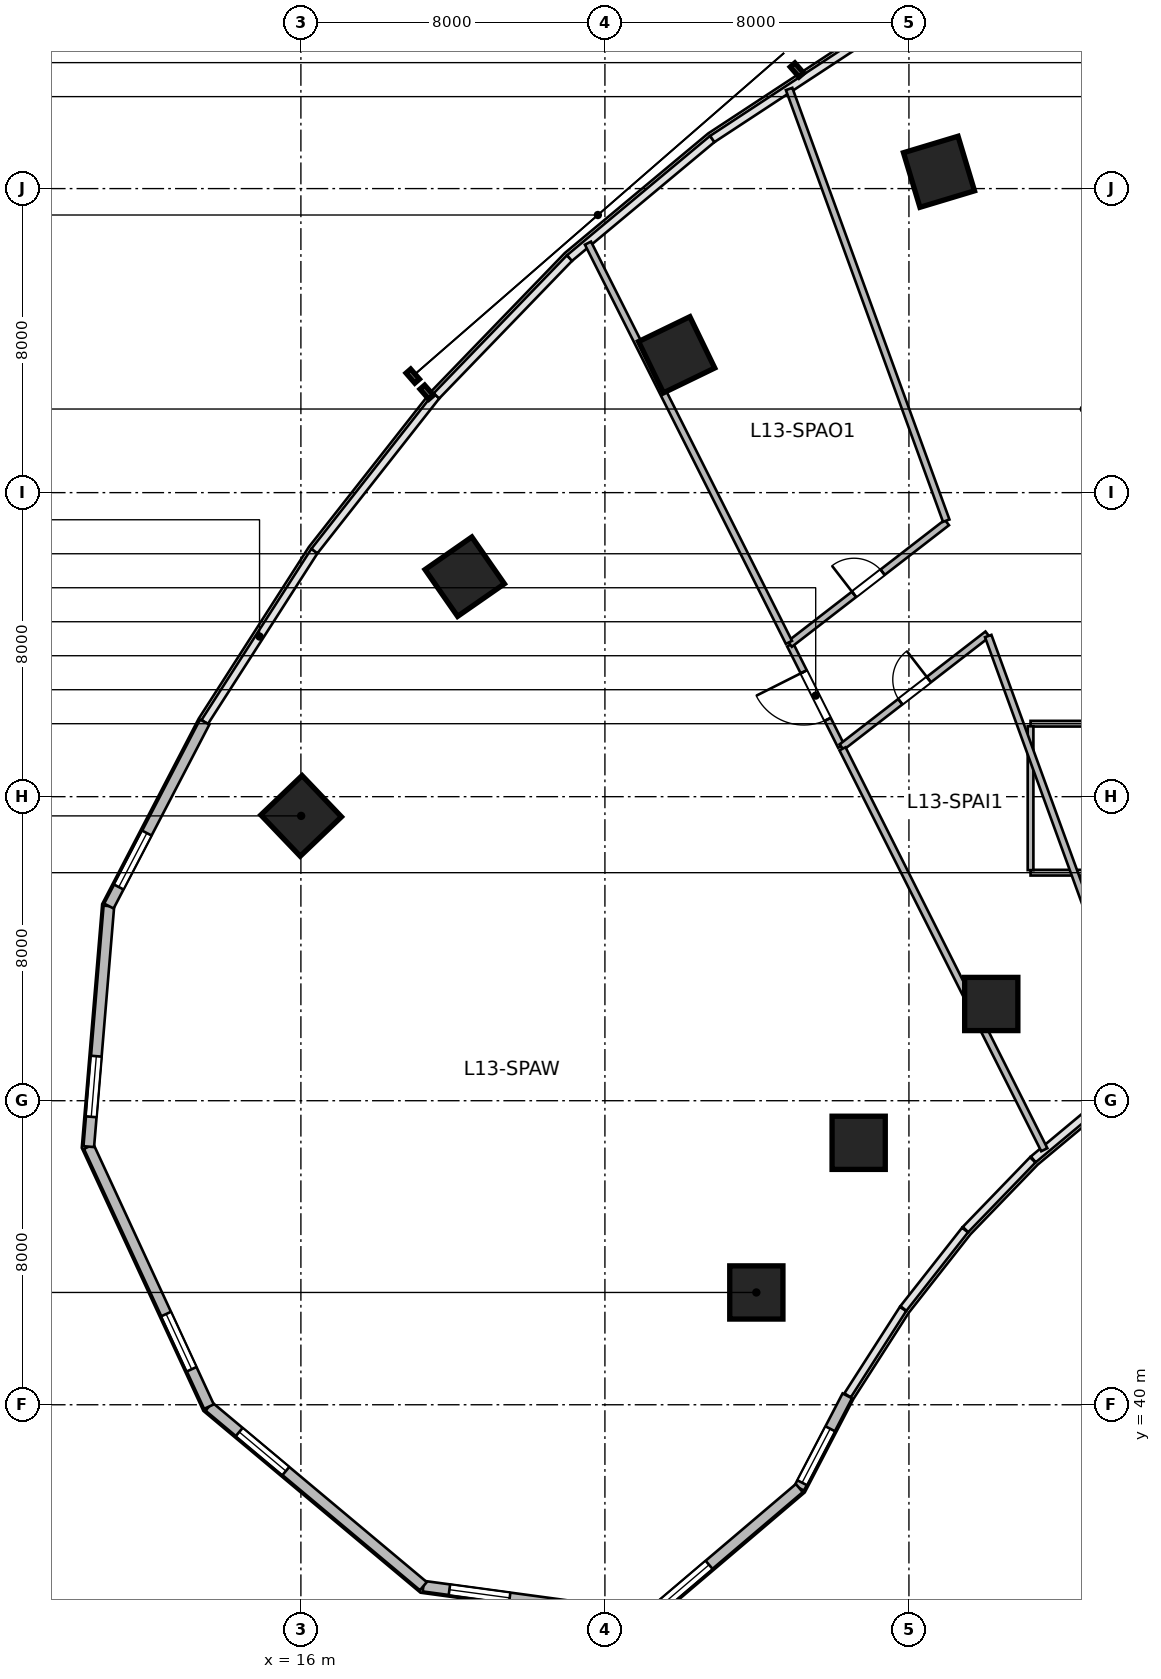
"""IFC4 building model, lengths in metres.
Left out: names, types, materials, properties, quantities, classifications, styles, units other than length and angle.
Written with IfcOpenShell. Run it as: python <this file> out.ifc"""

import sys

from ifc_helpers import new_model, si_unit, direction, frame, frame_2d, origin, origin_2d, place, context, subcontext, project, spatial, rectangle, circle, extrude, source, transform, mapped, element, fill, save


model = new_model("IFC4")
c1 = context("Model", 3, precision=1e-05, world=origin(), true_north=direction((0.0, 1.0)))
c2 = subcontext(c1, "Body", "Model", "MODEL_VIEW")
j1 = project(units=[si_unit("LENGTHUNIT", "METRE"), si_unit("PLANEANGLEUNIT", "RADIAN")], contexts=[c1])
p1 = place(None, origin())
s1 = spatial("IfcSite", under=j1, at=p1, CompositionType="ELEMENT")
p2 = place(p1, origin())
s2 = spatial("IfcBuilding", under=s1, at=p2, CompositionType="ELEMENT")
p3 = place(p2, frame((0.0, 0.0, 60.6)))
s3 = spatial("IfcBuildingStorey", under=s2, at=p3, CompositionType="ELEMENT", Elevation=60.6)
m1 = source(origin(), c2, "Body", "SweptSolid", [
    extrude(circle(Radius=0.7, at=origin_2d()), origin(), (0.0, 0.0, 1.0), 3.6),
])
p4 = place(p3, frame((27.985, 42.955, 0.0), z_axis=(0.0, 0.0, 1.0), x_axis=(-0.690756218984, 0.723087716626, 0.0)))
e1 = element("IfcColumn", 1, at=p4, inside=s3, PredefinedType="COLUMN", context=c2, shape_type="MappedRepresentation", body=[
    mapped(m1, transform((0.0, 0.0, 0.0), scale=1.0)),
])
m2 = source(origin(), c2, "Body", "SweptSolid", [
    extrude(rectangle(XDim=1.5, YDim=1.5, at=origin_2d()), origin(), (0.0, 0.0, 1.0), 3.6),
])
p5 = place(p3, frame((16.007, 55.494, 0.0), z_axis=(0.0, 0.0, 1.0), x_axis=(-0.690756218984, 0.723087716626, 0.0)))
e2 = element("IfcColumn", 2, at=p5, inside=s3, PredefinedType="COLUMN", context=c2, shape_type="MappedRepresentation", body=[
    mapped(m2, transform((0.0, 0.0, 0.0), scale=1.0)),
])
p6 = place(p3, frame((30.677, 46.892, 0.0), z_axis=(0.0, 0.0, 1.0), x_axis=(-0.571143442153, 0.820850271661, 0.0)))
e3 = element("IfcColumn", 3, at=p6, inside=s3, PredefinedType="COLUMN", context=c2, shape_type="MappedRepresentation", body=[
    mapped(m1, transform((0.0, 0.0, 0.0), scale=1.0)),
])
p7 = place(p3, frame((20.311, 61.789, 0.0), z_axis=(0.0, 0.0, 1.0), x_axis=(-0.571143442153, 0.820850271661, 0.0)))
e4 = element("IfcColumn", 4, at=p7, inside=s3, PredefinedType="COLUMN", context=c2, shape_type="MappedRepresentation", body=[
    mapped(m2, transform((0.0, 0.0, 0.0), scale=1.0)),
])
p8 = place(p3, frame((34.166, 50.545, 0.0), z_axis=(0.0, 0.0, 1.0), x_axis=(-0.436173672171, 0.899862504889, 0.0)))
e5 = element("IfcColumn", 5, at=p8, inside=s3, PredefinedType="COLUMN", context=c2, shape_type="MappedRepresentation", body=[
    mapped(m1, transform((0.0, 0.0, 0.0), scale=1.0)),
])
for number, where, z_axis, x_axis in (
    (6, (25.888, 67.627, 0.0), (0.0, 0.0, 1.0), (-0.436, 0.9, 0.0)),
    (7, (32.791, 72.442, 0.0), (0.0, 0.0, 1.0), (-0.289, 0.957, 0.0)),
):
    element("IfcColumn", number, at=place(p3, frame(where, z_axis=z_axis, x_axis=x_axis)), inside=s3, PredefinedType="COLUMN", context=c2, shape_type="MappedRepresentation", body=[
        mapped(m2, transform((0.0, 0.0, 0.0), scale=1.0)),
    ])
m3 = source(origin(), c2, "Body", "SweptSolid", [
    extrude(rectangle(XDim=2.735, YDim=0.28, at=frame_2d((1.368, 0.0))), origin(), (0.0, 0.0, 1.0), 3.36),
])
p9 = place(p3, frame((30.378, 40.234, 0.0), z_axis=(0.0, 0.0, 1.0), x_axis=(-0.46179107292, -0.886988728774, 0.0)))
e8 = element("IfcWall", 8, at=p9, inside=s3, PredefinedType="SOLIDWALL", context=c2, shape_type="MappedRepresentation", body=[
    mapped(m3, transform((0.0, 0.0, 0.0), scale=1.0)),
])
p10 = place(p9, frame((0.976, 0.0, 0.95)))
e9 = element("IfcOpeningElement", 9, at=p10, cuts=e8, PredefinedType="OPENING", context=c2, shape_type="SweptSolid", body=[
    extrude(rectangle(XDim=1.6, YDim=1.9, at=frame_2d((0.8, 0.95))), frame((0.0, 0.15, 0.0), z_axis=(0.0, -1.0, 0.0), x_axis=(1.0, 0.0, 0.0)), (0.0, 0.0, 1.0), 0.3),
])
m4 = source(origin(), c2, "Body", "SweptSolid", [
    extrude(rectangle(XDim=5.222, YDim=0.28, at=frame_2d((2.611, 0.0))), origin(), (0.0, 0.0, 1.0), 3.36),
])
p11 = place(p3, frame((29.115, 37.807, 0.0), z_axis=(0.0, 0.0, 1.0), x_axis=(-0.761900099546, -0.647694556339, 0.0)))
e10 = element("IfcWall", 10, at=p11, inside=s3, PredefinedType="SOLIDWALL", context=c2, shape_type="MappedRepresentation", body=[
    mapped(m4, transform((0.0, 0.0, 0.0), scale=1.0)),
])
p12 = place(p11, frame((3.117, 0.0, 0.95)))
e11 = element("IfcOpeningElement", 11, at=p12, cuts=e10, PredefinedType="OPENING", context=c2, shape_type="SweptSolid", body=[
    extrude(rectangle(XDim=1.6, YDim=1.9, at=frame_2d((0.8, 0.95))), frame((0.0, 0.15, 0.0), z_axis=(0.0, -1.0, 0.0), x_axis=(1.0, 0.0, 0.0)), (0.0, 0.0, 1.0), 0.3),
])
m5 = source(origin(), c2, "Body", "SweptSolid", [
    extrude(rectangle(XDim=5.967, YDim=0.28, at=frame_2d((2.984, 0.0))), origin(), (0.0, 0.0, 1.0), 3.36),
])
p13 = place(p3, frame((25.136, 34.425, 0.0), z_axis=(0.0, 0.0, 1.0), x_axis=(-0.990927009341, 0.134401124099, 0.0)))
e12 = element("IfcWall", 12, at=p13, inside=s3, PredefinedType="SOLIDWALL", context=c2, shape_type="MappedRepresentation", body=[
    mapped(m5, transform((0.0, 0.0, 0.0), scale=1.0)),
])
p14 = place(p13, frame((3.676, 0.0, 0.95)))
e13 = element("IfcOpeningElement", 13, at=p14, cuts=e12, PredefinedType="OPENING", context=c2, shape_type="SweptSolid", body=[
    extrude(rectangle(XDim=1.6, YDim=1.9, at=frame_2d((0.8, 0.95))), frame((0.0, 0.15, 0.0), z_axis=(0.0, -1.0, 0.0), x_axis=(1.0, 0.0, 0.0)), (0.0, 0.0, 1.0), 0.3),
])
m6 = source(origin(), c2, "Body", "SweptSolid", [
    extrude(rectangle(XDim=7.359, YDim=0.28, at=frame_2d((3.679, 0.0))), origin(), (0.0, 0.0, 1.0), 3.36),
])
p15 = place(p3, frame((19.223, 35.227, 0.0), z_axis=(0.0, 0.0, 1.0), x_axis=(-0.766737165543, 0.641961150675, 0.0)))
e14 = element("IfcWall", 14, at=p15, inside=s3, PredefinedType="SOLIDWALL", context=c2, shape_type="MappedRepresentation", body=[
    mapped(m6, transform((0.0, 0.0, 0.0), scale=1.0)),
])
p16 = place(p15, frame((4.719, 0.0, 0.95)))
e15 = element("IfcOpeningElement", 15, at=p16, cuts=e14, PredefinedType="OPENING", context=c2, shape_type="SweptSolid", body=[
    extrude(rectangle(XDim=1.6, YDim=1.9, at=frame_2d((0.8, 0.95))), frame((0.0, 0.15, 0.0), z_axis=(0.0, -1.0, 0.0), x_axis=(1.0, 0.0, 0.0)), (0.0, 0.0, 1.0), 0.3),
])
m7 = source(origin(), c2, "Body", "SweptSolid", [
    extrude(rectangle(XDim=7.536, YDim=0.28, at=frame_2d((3.768, 0.0))), origin(), (0.0, 0.0, 1.0), 3.36),
])
p17 = place(p3, frame((13.58, 39.951, 0.0), z_axis=(0.0, 0.0, 1.0), x_axis=(-0.41964973873, 0.907686122393, 0.0)))
e16 = element("IfcWall", 16, at=p17, inside=s3, PredefinedType="SOLIDWALL", context=c2, shape_type="MappedRepresentation", body=[
    mapped(m7, transform((0.0, 0.0, 0.0), scale=1.0)),
])
p18 = place(p17, frame((1.084, 0.0, 0.95)))
e17 = element("IfcOpeningElement", 17, at=p18, cuts=e16, PredefinedType="OPENING", context=c2, shape_type="SweptSolid", body=[
    extrude(rectangle(XDim=1.6, YDim=1.9, at=frame_2d((0.8, 0.95))), frame((0.0, 0.15, 0.0), z_axis=(0.0, -1.0, 0.0), x_axis=(1.0, 0.0, 0.0)), (0.0, 0.0, 1.0), 0.3),
])
m8 = source(origin(), c2, "Body", "SweptSolid", [
    extrude(rectangle(XDim=6.353, YDim=0.28, at=frame_2d((3.176, 0.0))), origin(), (0.0, 0.0, 1.0), 3.36),
])
p19 = place(p3, frame((10.418, 46.792, 0.0), z_axis=(0.0, 0.0, 1.0), x_axis=(0.083319001377, 0.996522926986, 0.0)))
e18 = element("IfcWall", 18, at=p19, inside=s3, PredefinedType="SOLIDWALL", context=c2, shape_type="MappedRepresentation", body=[
    mapped(m8, transform((0.0, 0.0, 0.0), scale=1.0)),
])
p20 = place(p19, frame((0.788, 0.0, 0.95)))
e19 = element("IfcOpeningElement", 19, at=p20, cuts=e18, PredefinedType="OPENING", context=c2, shape_type="SweptSolid", body=[
    extrude(rectangle(XDim=1.6, YDim=1.9, at=frame_2d((0.8, 0.95))), frame((0.0, 0.15, 0.0), z_axis=(0.0, -1.0, 0.0), x_axis=(1.0, 0.0, 0.0)), (0.0, 0.0, 1.0), 0.3),
])
m9 = source(origin(), c2, "Body", "SweptSolid", [
    extrude(rectangle(XDim=5.459, YDim=0.28, at=frame_2d((2.73, 0.0))), origin(), (0.0, 0.0, 1.0), 3.36),
])
p21 = place(p3, frame((10.947, 53.122, 0.0), z_axis=(0.0, 0.0, 1.0), x_axis=(0.461768054321, 0.887000712518, 0.0)))
e20 = element("IfcWall", 20, at=p21, inside=s3, PredefinedType="SOLIDWALL", context=c2, shape_type="MappedRepresentation", body=[
    mapped(m9, transform((0.0, 0.0, 0.0), scale=1.0)),
])
p22 = place(p21, frame((0.565, 0.0, 0.95)))
e21 = element("IfcOpeningElement", 21, at=p22, cuts=e20, PredefinedType="OPENING", context=c2, shape_type="SweptSolid", body=[
    extrude(rectangle(XDim=1.6, YDim=1.9, at=frame_2d((0.8, 0.95))), frame((0.0, 0.15, 0.0), z_axis=(0.0, -1.0, 0.0), x_axis=(1.0, 0.0, 0.0)), (0.0, 0.0, 1.0), 0.3),
])
m10 = source(origin(), c2, "Body", "SweptSolid", [
    extrude(rectangle(XDim=6.6, YDim=0.15, at=frame_2d((3.3, 0.0))), origin(), (0.0, 0.0, 1.0), 2.803),
])
p23 = place(p3, frame((35.2, 54.0, 0.0), z_axis=(0.0, 0.0, 1.0), x_axis=(1.0, 0.0, 0.0)))
e22 = element("IfcWall", 22, at=p23, inside=s3, PredefinedType="PARTITIONING", context=c2, shape_type="MappedRepresentation", body=[
    mapped(m10, transform((0.0, 0.0, 0.0), scale=1.0)),
])
m11 = source(origin(), c2, "Body", "SweptSolid", [
    extrude(rectangle(XDim=6.6, YDim=0.15, at=frame_2d((3.3, 0.0))), origin(), (0.0, 0.0, 1.0), 3.36),
])
p24 = place(p3, frame((35.2, 57.92, 0.0), z_axis=(0.0, 0.0, 1.0), x_axis=(1.0, 0.0, 0.0)))
e23 = element("IfcWall", 23, at=p24, inside=s3, PredefinedType="PARTITIONING", context=c2, shape_type="MappedRepresentation", body=[
    mapped(m11, transform((0.0, 0.0, 0.0), scale=1.0)),
])
p25 = place(p24, frame((2.85, 0.0, 0.0)))
e24 = element("IfcOpeningElement", 24, at=p25, cuts=e23, PredefinedType="OPENING", context=c2, shape_type="SweptSolid", body=[
    extrude(rectangle(XDim=0.9, YDim=2.1, at=frame_2d((0.45, 1.05))), frame((0.0, 0.085, 0.0), z_axis=(0.0, -1.0, 0.0), x_axis=(1.0, 0.0, 0.0)), (0.0, 0.0, 1.0), 0.17),
])
m12 = source(origin(), c2, "Body", "SweptSolid", [
    extrude(rectangle(XDim=3.785, YDim=0.15, at=frame_2d((1.893, 0.0))), origin(), (0.0, 0.0, 1.0), 3.36),
])
p26 = place(p3, frame((35.2, 54.067, 0.0), z_axis=(0.0, 0.0, 1.0), x_axis=(0.0, 1.0, 0.0)))
e25 = element("IfcWall", 25, at=p26, inside=s3, PredefinedType="PARTITIONING", context=c2, shape_type="MappedRepresentation", body=[
    mapped(m12, transform((0.0, 0.0, 0.0), scale=1.0)),
])
m13 = source(origin(), c2, "Body", "SweptSolid", [
    extrude(rectangle(XDim=2.985, YDim=0.18, at=frame_2d((1.493, 0.0))), origin(), (0.0, 0.0, 1.0), 3.36),
])
p27 = place(p3, frame((30.218, 57.327, 0.0), z_axis=(0.0, 0.0, 1.0), x_axis=(-0.449665526069, 0.893197018952, 0.0)))
e26 = element("IfcWall", 26, at=p27, inside=s3, PredefinedType="PLUMBINGWALL", context=c2, shape_type="MappedRepresentation", body=[
    mapped(m13, transform((0.0, 0.0, 0.0), scale=1.0)),
])
p28 = place(p27, frame((0.792, 0.0, 0.0)))
e27 = element("IfcOpeningElement", 27, at=p28, cuts=e26, PredefinedType="OPENING", context=c2, shape_type="SweptSolid", body=[
    extrude(rectangle(XDim=1.4, YDim=2.15, at=frame_2d((0.7, 1.075))), frame((0.0, 0.1, 0.0), z_axis=(0.0, -1.0, 0.0), x_axis=(1.0, 0.0, 0.0)), (0.0, 0.0, 1.0), 0.2),
])
m14 = source(origin(), c2, "Body", "SweptSolid", [
    extrude(rectangle(XDim=5.227, YDim=0.18, at=frame_2d((2.614, 0.0))), origin(), (0.0, 0.0, 1.0), 3.36),
])
p29 = place(p3, frame((28.865, 60.015, 0.0), z_axis=(0.0, 0.0, 1.0), x_axis=(0.790908912792, 0.61193389485, 0.0)))
e28 = element("IfcWall", 28, at=p29, inside=s3, PredefinedType="PLUMBINGWALL", context=c2, shape_type="MappedRepresentation", body=[
    mapped(m14, transform((0.0, 0.0, 0.0), scale=1.0)),
])
p30 = place(p29, frame((2.139, 0.0, 0.0)))
e29 = element("IfcOpeningElement", 29, at=p30, cuts=e28, PredefinedType="OPENING", context=c2, shape_type="SweptSolid", body=[
    extrude(rectangle(XDim=0.95, YDim=2.1, at=frame_2d((0.475, 1.05))), frame((0.0, 0.1, 0.0), z_axis=(0.0, -1.0, 0.0), x_axis=(1.0, 0.0, 0.0)), (0.0, 0.0, 1.0), 0.2),
])
m15 = source(origin(), c2, "Body", "SweptSolid", [
    extrude(rectangle(XDim=11.761, YDim=0.18, at=frame_2d((5.88, 0.0))), origin(), (0.0, 0.0, 1.0), 3.36),
])
p31 = place(p3, frame((28.842, 60.06, 0.0), z_axis=(0.0, 0.0, 1.0), x_axis=(-0.449611686329, 0.893224121661, 0.0)))
e30 = element("IfcWall", 30, at=p31, inside=s3, PredefinedType="PLUMBINGWALL", context=c2, shape_type="MappedRepresentation", body=[
    mapped(m15, transform((0.0, 0.0, 0.0), scale=1.0)),
])
m16 = source(origin(), c2, "Body", "SweptSolid", [
    extrude(rectangle(XDim=12.088, YDim=0.18, at=frame_2d((6.044, 0.0))), origin(), (0.0, 0.0, 1.0), 3.36),
])
p32 = place(p3, frame((32.981, 63.262, 0.0), z_axis=(0.0, 0.0, 1.0), x_axis=(-0.34203007529, 0.939689005787, 0.0)))
e31 = element("IfcWall", 31, at=p32, inside=s3, PredefinedType="PLUMBINGWALL", context=c2, shape_type="MappedRepresentation", body=[
    mapped(m16, transform((0.0, 0.0, 0.0), scale=1.0)),
])
m17 = source(origin(), c2, "Body", "SweptSolid", [
    extrude(rectangle(XDim=4.855, YDim=0.18, at=frame_2d((2.427, 0.0))), origin(), (0.0, 0.0, 1.0), 3.36),
])
p33 = place(p3, frame((30.229, 57.305, 0.0), z_axis=(0.0, 0.0, 1.0), x_axis=(0.790930965655, 0.611905391028, 0.0)))
e32 = element("IfcWall", 32, at=p33, inside=s3, PredefinedType="PLUMBINGWALL", context=c2, shape_type="MappedRepresentation", body=[
    mapped(m17, transform((0.0, 0.0, 0.0), scale=1.0)),
])
p34 = place(p33, frame((1.952, 0.0, 0.0)))
e33 = element("IfcOpeningElement", 33, at=p34, cuts=e32, PredefinedType="OPENING", context=c2, shape_type="SweptSolid", body=[
    extrude(rectangle(XDim=0.95, YDim=2.1, at=frame_2d((0.475, 1.05))), frame((0.0, 0.1, 0.0), z_axis=(0.0, -1.0, 0.0), x_axis=(1.0, 0.0, 0.0)), (0.0, 0.0, 1.0), 0.2),
])
m18 = source(origin(), c2, "Body", "SweptSolid", [
    extrude(rectangle(XDim=11.811, YDim=0.18, at=frame_2d((5.906, 0.0))), origin(), (0.0, 0.0, 1.0), 3.36),
])
p35 = place(p3, frame((35.562, 46.71, 0.0), z_axis=(0.0, 0.0, 1.0), x_axis=(-0.449626289102, 0.893216771086, 0.0)))
e34 = element("IfcWall", 34, at=p35, inside=s3, PredefinedType="PLUMBINGWALL", context=c2, shape_type="MappedRepresentation", body=[
    mapped(m18, transform((0.0, 0.0, 0.0), scale=1.0)),
])
m19 = source(origin(), c2, "Body", "SweptSolid", [
    extrude(rectangle(XDim=12.196, YDim=0.18, at=frame_2d((6.098, 0.0))), origin(), (0.0, 0.0, 1.0), 3.36),
])
p36 = place(p3, frame((38.258, 48.766, 0.0), z_axis=(0.0, 0.0, 1.0), x_axis=(-0.342022711534, 0.939691686031, 0.0)))
e35 = element("IfcWall", 35, at=p36, inside=s3, PredefinedType="PLUMBINGWALL", context=c2, shape_type="MappedRepresentation", body=[
    mapped(m19, transform((0.0, 0.0, 0.0), scale=1.0)),
])
m20 = source(origin(), c2, "Body", "SweptSolid", [
    extrude(rectangle(XDim=1.6, YDim=1.9, at=frame_2d((0.8, 0.95))), frame((0.0, 0.03, 0.0), z_axis=(0.0, -1.0, 0.0), x_axis=(1.0, 0.0, 0.0)), (0.0, 0.0, 1.0), 0.06),
])
p37 = place(p10, origin())
e36 = element("IfcWindow", 36, at=p37, inside=s3, PartitioningType="SINGLE_PANEL", PredefinedType="WINDOW", context=c2, shape_type="MappedRepresentation", body=[
    mapped(m20, transform((0.0, 0.0, 0.0), scale=1.0)),
])
fill(e9, e36)
p38 = place(p12, origin())
e37 = element("IfcWindow", 37, at=p38, inside=s3, PartitioningType="SINGLE_PANEL", PredefinedType="WINDOW", context=c2, shape_type="MappedRepresentation", body=[
    mapped(m20, transform((0.0, 0.0, 0.0), scale=1.0)),
])
fill(e11, e37)
p39 = place(p14, origin())
e38 = element("IfcWindow", 38, at=p39, inside=s3, PartitioningType="SINGLE_PANEL", PredefinedType="WINDOW", context=c2, shape_type="MappedRepresentation", body=[
    mapped(m20, transform((0.0, 0.0, 0.0), scale=1.0)),
])
fill(e13, e38)
p40 = place(p16, origin())
e39 = element("IfcWindow", 39, at=p40, inside=s3, PartitioningType="SINGLE_PANEL", PredefinedType="WINDOW", context=c2, shape_type="MappedRepresentation", body=[
    mapped(m20, transform((0.0, 0.0, 0.0), scale=1.0)),
])
fill(e15, e39)
p41 = place(p18, origin())
e40 = element("IfcWindow", 40, at=p41, inside=s3, PartitioningType="SINGLE_PANEL", PredefinedType="WINDOW", context=c2, shape_type="MappedRepresentation", body=[
    mapped(m20, transform((0.0, 0.0, 0.0), scale=1.0)),
])
fill(e17, e40)
p42 = place(p20, origin())
e41 = element("IfcWindow", 41, at=p42, inside=s3, PartitioningType="SINGLE_PANEL", PredefinedType="WINDOW", context=c2, shape_type="MappedRepresentation", body=[
    mapped(m20, transform((0.0, 0.0, 0.0), scale=1.0)),
])
fill(e19, e41)
p43 = place(p22, origin())
e42 = element("IfcWindow", 42, at=p43, inside=s3, PartitioningType="SINGLE_PANEL", PredefinedType="WINDOW", context=c2, shape_type="MappedRepresentation", body=[
    mapped(m20, transform((0.0, 0.0, 0.0), scale=1.0)),
])
fill(e21, e42)
m21 = source(origin(), c2, "Body", "SweptSolid", [
    extrude(rectangle(XDim=1.4, YDim=2.15, at=frame_2d((0.7, 1.075))), frame((0.0, 0.025, 0.0), z_axis=(0.0, -1.0, 0.0), x_axis=(1.0, 0.0, 0.0)), (0.0, 0.0, 1.0), 0.05),
])
p44 = place(p28, origin())
e43 = element("IfcDoor", 43, at=p44, inside=s3, OperationType="SINGLE_SWING_RIGHT", PredefinedType="DOOR", context=c2, shape_type="MappedRepresentation", body=[
    mapped(m21, transform((0.0, 0.0, 0.0), scale=1.0)),
])
fill(e27, e43)
m22 = source(origin(), c2, "Body", "SweptSolid", [
    extrude(rectangle(XDim=0.95, YDim=2.1, at=frame_2d((0.475, 1.05))), frame((0.0, 0.025, 0.0), z_axis=(0.0, -1.0, 0.0), x_axis=(1.0, 0.0, 0.0)), (0.0, 0.0, 1.0), 0.05),
])
p45 = place(p30, origin())
e44 = element("IfcDoor", 44, at=p45, inside=s3, OperationType="SINGLE_SWING_LEFT", PredefinedType="DOOR", context=c2, shape_type="MappedRepresentation", body=[
    mapped(m22, transform((0.0, 0.0, 0.0), scale=1.0)),
])
fill(e29, e44)
p46 = place(p34, origin())
e45 = element("IfcDoor", 45, at=p46, inside=s3, OperationType="SINGLE_SWING_RIGHT", PredefinedType="DOOR", context=c2, shape_type="MappedRepresentation", body=[
    mapped(m22, transform((0.0, 0.0, 0.0), scale=1.0)),
])
fill(e33, e45)
save(model, sys.argv[1])
